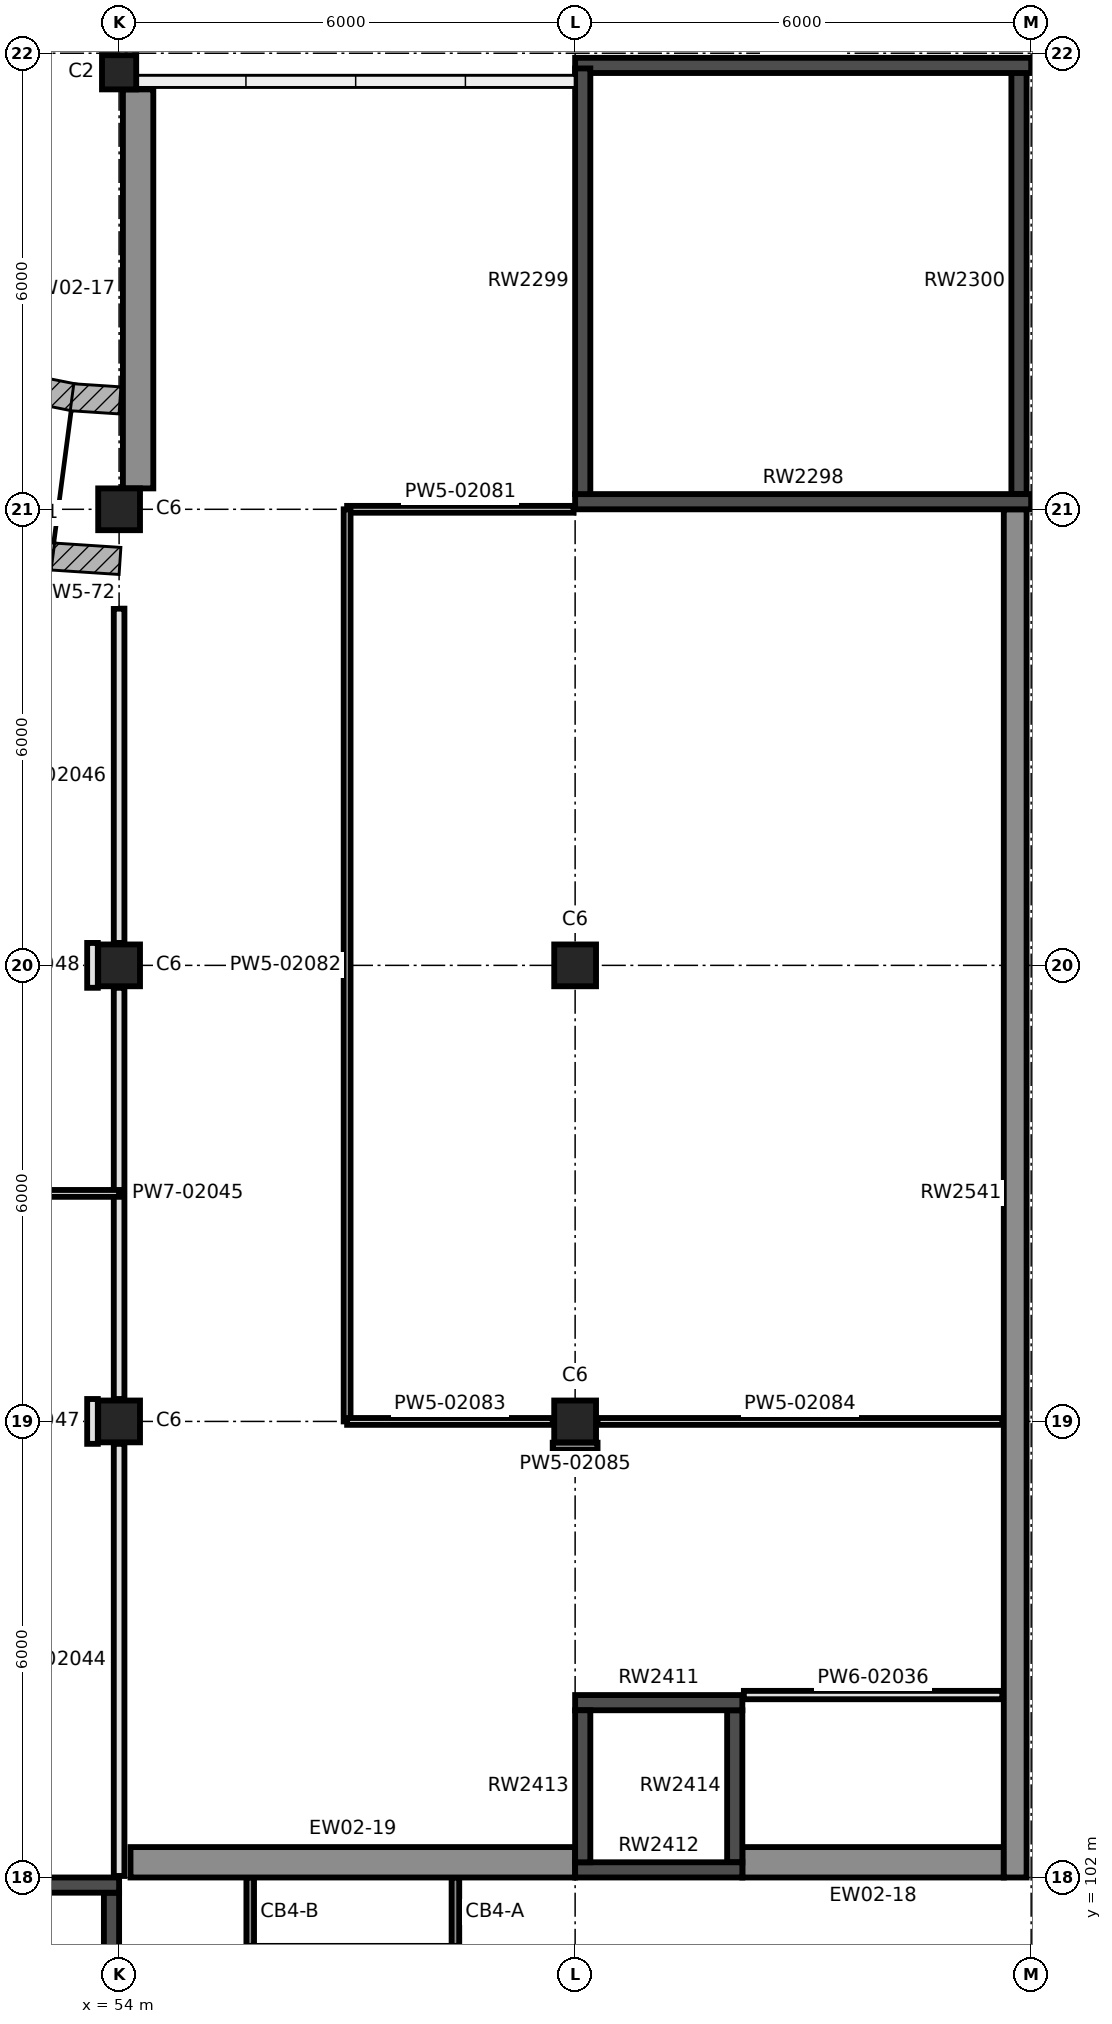
"""IFC4 building model, lengths in metres.
Left out: names, types, materials, properties, quantities, classifications, styles, units other than length and angle.
Written with IfcOpenShell. Run it as: python <this file> out.ifc"""

import sys

from ifc_helpers import new_model, si_unit, direction, frame, frame_2d, origin, origin_2d, place, context, subcontext, project, spatial, polyline, rectangle, outline, extrude, element, fill, save


model = new_model("IFC4")
c1 = context("Model", 3, precision=1e-05, world=origin(), true_north=direction((0.0, 1.0)))
c2 = subcontext(c1, "Body", "Model", "MODEL_VIEW")
j1 = project(units=[si_unit("LENGTHUNIT", "METRE"), si_unit("PLANEANGLEUNIT", "RADIAN")], contexts=[c1])
p1 = place(None, origin())
s1 = spatial("IfcSite", under=j1, at=p1, CompositionType="ELEMENT")
p2 = place(p1, origin())
s2 = spatial("IfcBuilding", under=s1, at=p2, CompositionType="ELEMENT")
p3 = place(p2, frame((0.0, 0.0, 12.0)))
s3 = spatial("IfcBuildingStorey", under=s2, at=p3, CompositionType="ELEMENT", Elevation=12.0)
for number, where, z_axis, x_axis in (
    (1, (54.0, 108.0, 0.0), (0.0, 0.0, 1.0), (1.0, 0.0, 0.0)),
    (2, (60.0, 108.0, 0.0), (0.0, 0.0, 1.0), (1.0, 0.0, 0.0)),
    (3, (54.0, 114.0, 0.0), (0.0, 0.0, 1.0), (1.0, 0.0, 0.0)),
    (4, (60.0, 114.0, 0.0), (0.0, 0.0, 1.0), (1.0, 0.0, 0.0)),
    (5, (54.0, 120.0, 0.0), (0.0, 0.0, 1.0), (1.0, 0.0, 0.0)),
):
    element("IfcColumn", number, at=place(p3, frame(where, z_axis=z_axis, x_axis=x_axis)), inside=s3, PredefinedType="COLUMN", context=c2, shape_type="SweptSolid", body=[
        extrude(rectangle(XDim=0.55, YDim=0.55, at=origin_2d()), origin(), (0.0, 0.0, 1.0), 4.25),
    ])
p4 = place(p3, frame((54.0, 125.75, 0.0), z_axis=(0.0, 0.0, 1.0), x_axis=(1.0, 0.0, 0.0)))
e6 = element("IfcColumn", 6, at=p4, inside=s3, PredefinedType="COLUMN", context=c2, shape_type="SweptSolid", body=[
    extrude(rectangle(XDim=0.45, YDim=0.45, at=origin_2d()), origin(), (0.0, 0.0, 1.0), 4.25),
])
p5 = place(p3, frame((48.0, 101.9, 0.0), z_axis=(0.0, 0.0, 1.0), x_axis=(1.0, 0.0, 0.0)))
e7 = element("IfcWall", 7, at=p5, inside=s3, PredefinedType="SHEAR", context=c2, shape_type="SweptSolid", body=[
    extrude(rectangle(XDim=6.0, YDim=0.2, at=frame_2d((3.0, 0.0))), origin(), (0.0, 0.0, 1.0), 4.5),
])
p6 = place(p5, frame((2.1, 0.0, 0.0)))
e8 = element("IfcOpeningElement", 8, at=p6, cuts=e7, PredefinedType="OPENING", context=c2, shape_type="SweptSolid", body=[
    extrude(rectangle(XDim=1.8, YDim=2.2, at=frame_2d((0.9, 1.1))), frame((0.0, 0.11, 0.0), z_axis=(0.0, -1.0, 0.0), x_axis=(1.0, 0.0, 0.0)), (0.0, 0.0, 1.0), 0.22),
])
p7 = place(p3, frame((53.9, 96.2, 0.0), z_axis=(0.0, 0.0, 1.0), x_axis=(0.0, 1.0, 0.0)))
e9 = element("IfcWall", 9, at=p7, inside=s3, PredefinedType="SHEAR", context=c2, shape_type="SweptSolid", body=[
    extrude(rectangle(XDim=5.6, YDim=0.2, at=frame_2d((2.8, 0.0))), origin(), (0.0, 0.0, 1.0), 4.5),
])
p8 = place(p7, frame((2.55, 0.0, 0.9)))
e10 = element("IfcOpeningElement", 10, at=p8, cuts=e9, PredefinedType="OPENING", context=c2, shape_type="SweptSolid", body=[
    extrude(rectangle(XDim=0.5, YDim=2.1, at=frame_2d((0.25, 1.05))), frame((0.0, 0.11, 0.0), z_axis=(0.0, -1.0, 0.0), x_axis=(1.0, 0.0, 0.0)), (0.0, 0.0, 1.0), 0.22),
])
for number, where, z_axis, x_axis in (
    (11, (60.0, 125.84, 0.0), (0.0, 0.0, 1.0), (1.0, 0.0, 0.0)),
    (12, (60.0, 120.1, 0.0), (0.0, 0.0, 1.0), (1.0, 0.0, 0.0)),
):
    element("IfcWall", number, at=place(p3, frame(where, z_axis=z_axis, x_axis=x_axis)), inside=s3, PredefinedType="SHEAR", context=c2, shape_type="SweptSolid", body=[
        extrude(rectangle(XDim=6.0, YDim=0.2, at=frame_2d((3.0, 0.0))), origin(), (0.0, 0.0, 1.0), 4.25),
    ])
p9 = place(p3, frame((60.1, 120.2, 0.0), z_axis=(0.0, 0.0, 1.0), x_axis=(0.0, 1.0, 0.0)))
e13 = element("IfcWall", 13, at=p9, inside=s3, PredefinedType="SHEAR", context=c2, shape_type="SweptSolid", body=[
    extrude(rectangle(XDim=5.6, YDim=0.2, at=frame_2d((2.8, 0.0))), origin(), (0.0, 0.0, 1.0), 4.25),
])
p10 = place(p9, frame((4.4, 0.0, 0.0)))
e14 = element("IfcOpeningElement", 14, at=p10, cuts=e13, PredefinedType="OPENING", context=c2, shape_type="SweptSolid", body=[
    extrude(rectangle(XDim=1.1, YDim=2.2, at=frame_2d((0.55, 1.1))), frame((0.0, 0.11, 0.0), z_axis=(0.0, -1.0, 0.0), x_axis=(1.0, 0.0, 0.0)), (0.0, 0.0, 1.0), 0.22),
])
p11 = place(p3, frame((65.84, 120.2, 0.0), z_axis=(0.0, 0.0, 1.0), x_axis=(0.0, 1.0, 0.0)))
e15 = element("IfcWall", 15, at=p11, inside=s3, PredefinedType="SHEAR", context=c2, shape_type="SweptSolid", body=[
    extrude(rectangle(XDim=5.6, YDim=0.2, at=frame_2d((2.8, 0.0))), origin(), (0.0, 0.0, 1.0), 4.25),
])
p12 = place(p11, frame((2.55, 0.0, 0.9)))
e16 = element("IfcOpeningElement", 16, at=p12, cuts=e15, PredefinedType="OPENING", context=c2, shape_type="SweptSolid", body=[
    extrude(rectangle(XDim=0.5, YDim=2.1, at=frame_2d((0.25, 1.05))), frame((0.0, 0.11, 0.0), z_axis=(0.0, -1.0, 0.0), x_axis=(1.0, 0.0, 0.0)), (0.0, 0.0, 1.0), 0.22),
])
p13 = place(p3, frame((60.0, 104.3, 0.0), z_axis=(0.0, 0.0, 1.0), x_axis=(1.0, 0.0, 0.0)))
e17 = element("IfcWall", 17, at=p13, inside=s3, PredefinedType="SHEAR", context=c2, shape_type="SweptSolid", body=[
    extrude(rectangle(XDim=2.2, YDim=0.2, at=frame_2d((1.1, 0.0))), origin(), (0.0, 0.0, 1.0), 4.25),
])
p14 = place(p13, frame((0.55, 0.0, 0.0)))
e18 = element("IfcOpeningElement", 18, at=p14, cuts=e17, PredefinedType="OPENING", context=c2, shape_type="SweptSolid", body=[
    extrude(rectangle(XDim=1.1, YDim=2.1, at=frame_2d((0.55, 1.05))), frame((0.0, 0.11, 0.0), z_axis=(0.0, -1.0, 0.0), x_axis=(1.0, 0.0, 0.0)), (0.0, 0.0, 1.0), 0.22),
])
p15 = place(p3, frame((60.0, 102.1, 0.0), z_axis=(0.0, 0.0, 1.0), x_axis=(1.0, 0.0, 0.0)))
e19 = element("IfcWall", 19, at=p15, inside=s3, PredefinedType="SHEAR", context=c2, shape_type="SweptSolid", body=[
    extrude(rectangle(XDim=2.2, YDim=0.2, at=frame_2d((1.1, 0.0))), origin(), (0.0, 0.0, 1.0), 4.25),
])
for number, where, z_axis, x_axis in (
    (20, (60.1, 102.2, 0.0), (0.0, 0.0, 1.0), (0.0, 1.0, 0.0)),
    (21, (62.1, 102.2, 0.0), (0.0, 0.0, 1.0), (0.0, 1.0, 0.0)),
):
    element("IfcWall", number, at=place(p3, frame(where, z_axis=z_axis, x_axis=x_axis)), inside=s3, PredefinedType="SHEAR", context=c2, shape_type="SweptSolid", body=[
        extrude(rectangle(XDim=2.0, YDim=0.2, at=frame_2d((1.0, 0.0))), origin(), (0.0, 0.0, 1.0), 4.25),
    ])
p16 = place(p3, frame((65.79, 102.0, 0.0), z_axis=(0.0, 0.0, 1.0), x_axis=(0.0, 1.0, 0.0)))
e22 = element("IfcWall", 22, at=p16, inside=s3, PredefinedType="SOLIDWALL", context=c2, shape_type="SweptSolid", body=[
    extrude(rectangle(XDim=18.0, YDim=0.3, at=frame_2d((9.0, 0.0))), origin(), (0.0, 0.0, 1.0), 4.5),
])
p17 = place(p3, frame((53.105, 119.201, 0.0), z_axis=(-0.173864175636, -0.874485160623, 0.452821104058), x_axis=(-0.980806494595, 0.194983637213, -3.7134606e-05)))
e23 = element("IfcWall", 23, at=p17, inside=s3, PredefinedType="SOLIDWALL", context=c2, shape_type="SweptSolid", body=[
    extrude(outline(polyline([(0.0, 0.0), (0.897, 0.0), (0.758, -4.654), (0.138, -4.654), (0.0, 0.0)])), origin(), (0.0, 0.453, 0.892), 0.449),
])
p18 = place(p3, frame((54.0, 119.143, 0.0), z_axis=(-0.058375301922, -0.889685498337, 0.452826719811), x_axis=(-0.997852682036, 0.065498262539, 5.0577314e-05)))
e24 = element("IfcWall", 24, at=p18, inside=s3, PredefinedType="SOLIDWALL", context=c2, shape_type="SweptSolid", body=[
    extrude(outline(polyline([(0.0, 0.0), (0.897, -3.469e-18), (0.759, -4.654), (0.139, -4.654), (0.0, 0.0)])), origin(), (-9.547e-05, 0.453, 0.892), 0.449),
])
p19 = place(p3, frame((54.25, 120.275, 0.0), z_axis=(0.0, 0.0, 1.0), x_axis=(0.0, 1.0, 0.0)))
e25 = element("IfcWall", 25, at=p19, inside=s3, PredefinedType="SOLIDWALL", context=c2, shape_type="SweptSolid", body=[
    extrude(rectangle(XDim=5.25, YDim=0.4, at=frame_2d((2.625, 0.0))), origin(), (0.0, 0.0, 1.0), 4.25),
])
p20 = place(p3, frame((65.64, 102.2, 0.0), z_axis=(0.0, 0.0, 1.0), x_axis=(-1.0, 0.0, 0.0)))
e26 = element("IfcWall", 26, at=p20, inside=s3, PredefinedType="SOLIDWALL", context=c2, shape_type="SweptSolid", body=[
    extrude(rectangle(XDim=3.44, YDim=0.4, at=frame_2d((1.72, 0.0))), origin(), (0.0, 0.0, 1.0), 4.25),
])
p21 = place(p20, frame((1.045, 0.0, 0.9)))
e27 = element("IfcOpeningElement", 27, at=p21, cuts=e26, PredefinedType="OPENING", context=c2, shape_type="SweptSolid", body=[
    extrude(rectangle(XDim=1.35, YDim=2.45, at=frame_2d((0.675, 1.225))), frame((0.0, 0.21, 0.0), z_axis=(0.0, -1.0, 0.0), x_axis=(1.0, 0.0, 0.0)), (0.0, 0.0, 1.0), 0.42),
])
p22 = place(p3, frame((60.0, 102.2, 0.0), z_axis=(0.0, 0.0, 1.0), x_axis=(-1.0, 0.0, 0.0)))
e28 = element("IfcWall", 28, at=p22, inside=s3, PredefinedType="SOLIDWALL", context=c2, shape_type="SweptSolid", body=[
    extrude(rectangle(XDim=5.85, YDim=0.4, at=frame_2d((2.925, 0.0))), origin(), (0.0, 0.0, 1.0), 4.25),
])
p23 = place(p22, frame((1.725, 0.0, 0.9)))
e29 = element("IfcOpeningElement", 29, at=p23, cuts=e28, PredefinedType="OPENING", context=c2, shape_type="SweptSolid", body=[
    extrude(rectangle(XDim=2.4, YDim=2.45, at=frame_2d((1.2, 1.225))), frame((0.0, 0.21, 0.0), z_axis=(0.0, -1.0, 0.0), x_axis=(1.0, 0.0, 0.0)), (0.0, 0.0, 1.0), 0.42),
])
for number, where, z_axis, x_axis in (
    (30, (58.425, 102.0, 0.0), (0.0, 0.0, 1.0), (0.0, -1.0, 0.0)),
    (31, (55.725, 102.0, 0.0), (0.0, 0.0, 1.0), (0.0, -1.0, 0.0)),
):
    element("IfcWall", number, at=place(p3, frame(where, z_axis=z_axis, x_axis=x_axis)), inside=s3, PredefinedType="SOLIDWALL", context=c2, shape_type="SweptSolid", body=[
        extrude(rectangle(XDim=0.9, YDim=0.1, at=frame_2d((0.45, 0.0))), origin(), (0.0, 0.0, 1.0), 3.5),
    ])
p24 = place(p3, frame((62.22, 104.4, 0.0), z_axis=(0.0, 0.0, 1.0), x_axis=(1.0, 0.0, 0.0)))
e32 = element("IfcWall", 32, at=p24, inside=s3, PredefinedType="PARTITIONING", context=c2, shape_type="SweptSolid", body=[
    extrude(rectangle(XDim=3.4, YDim=0.11, at=frame_2d((1.7, 0.0))), origin(), (0.0, 0.0, 1.0), 4.28),
])
p25 = place(p24, frame((1.53, 0.0, 0.0)))
e33 = element("IfcOpeningElement", 33, at=p25, cuts=e32, PredefinedType="OPENING", context=c2, shape_type="SweptSolid", body=[
    extrude(rectangle(XDim=0.75, YDim=2.04, at=frame_2d((0.375, 1.02))), frame((0.0, 0.065, 0.0), z_axis=(0.0, -1.0, 0.0), x_axis=(1.0, 0.0, 0.0)), (0.0, 0.0, 1.0), 0.13),
])
p26 = place(p3, frame((54.0, 102.02, 0.0), z_axis=(0.0, 0.0, 1.0), x_axis=(0.0, 1.0, 0.0)))
e34 = element("IfcWall", 34, at=p26, inside=s3, PredefinedType="PARTITIONING", context=c2, shape_type="SweptSolid", body=[
    extrude(rectangle(XDim=5.685, YDim=0.14, at=frame_2d((2.843, 0.0))), origin(), (0.0, 0.0, 1.0), 3.55),
])
p27 = place(p26, frame((2.03, 0.0, 0.0)))
e35 = element("IfcOpeningElement", 35, at=p27, cuts=e34, PredefinedType="OPENING", context=c2, shape_type="SweptSolid", body=[
    extrude(rectangle(XDim=1.8, YDim=2.1, at=frame_2d((0.9, 1.05))), frame((0.0, 0.08, 0.0), z_axis=(0.0, -1.0, 0.0), x_axis=(1.0, 0.0, 0.0)), (0.0, 0.0, 1.0), 0.16),
])
p28 = place(p3, frame((54.0, 108.295, 0.0), z_axis=(0.0, 0.0, 1.0), x_axis=(0.0, 1.0, 0.0)))
e36 = element("IfcWall", 36, at=p28, inside=s3, PredefinedType="PARTITIONING", context=c2, shape_type="SweptSolid", body=[
    extrude(rectangle(XDim=5.41, YDim=0.14, at=frame_2d((2.705, 0.0))), origin(), (0.0, 0.0, 1.0), 3.45),
])
p29 = place(p28, frame((0.255, 0.0, 0.0)))
e37 = element("IfcOpeningElement", 37, at=p29, cuts=e36, PredefinedType="OPENING", context=c2, shape_type="SweptSolid", body=[
    extrude(rectangle(XDim=1.8, YDim=2.1, at=frame_2d((0.9, 1.05))), frame((0.0, 0.08, 0.0), z_axis=(0.0, -1.0, 0.0), x_axis=(1.0, 0.0, 0.0)), (0.0, 0.0, 1.0), 0.16),
])
p30 = place(p3, frame((54.0, 114.295, 0.0), z_axis=(0.0, 0.0, 1.0), x_axis=(0.0, 1.0, 0.0)))
e38 = element("IfcWall", 38, at=p30, inside=s3, PredefinedType="PARTITIONING", context=c2, shape_type="SweptSolid", body=[
    extrude(rectangle(XDim=4.398, YDim=0.14, at=frame_2d((2.199, 0.0))), origin(), (0.0, 0.0, 1.0), 3.45),
])
p31 = place(p30, frame((0.155, 0.0, 0.0)))
e39 = element("IfcOpeningElement", 39, at=p31, cuts=e38, PredefinedType="OPENING", context=c2, shape_type="SweptSolid", body=[
    extrude(rectangle(XDim=0.92, YDim=2.04, at=frame_2d((0.46, 1.02))), frame((0.0, 0.08, 0.0), z_axis=(0.0, -1.0, 0.0), x_axis=(1.0, 0.0, 0.0)), (0.0, 0.0, 1.0), 0.16),
])
p32 = place(p3, frame((53.65, 107.705, 0.0), z_axis=(0.0, 0.0, 1.0), x_axis=(0.0, 1.0, 0.0)))
e40 = element("IfcWall", 40, at=p32, inside=s3, PredefinedType="PARTITIONING", context=c2, shape_type="SweptSolid", body=[
    extrude(rectangle(XDim=0.59, YDim=0.14, at=frame_2d((0.295, 0.0))), origin(), (0.0, 0.0, 1.0), 3.55),
])
p33 = place(p3, frame((53.65, 113.705, 0.0), z_axis=(0.0, 0.0, 1.0), x_axis=(0.0, 1.0, 0.0)))
e41 = element("IfcWall", 41, at=p33, inside=s3, PredefinedType="PARTITIONING", context=c2, shape_type="SweptSolid", body=[
    extrude(rectangle(XDim=0.59, YDim=0.14, at=frame_2d((0.295, 0.0))), origin(), (0.0, 0.0, 1.0), 4.25),
])
p34 = place(p3, frame((48.0, 111.0, 0.0), z_axis=(0.0, 0.0, 1.0), x_axis=(1.0, 0.0, 0.0)))
e42 = element("IfcWall", 42, at=p34, inside=s3, PredefinedType="PARTITIONING", context=c2, shape_type="SweptSolid", body=[
    extrude(rectangle(XDim=6.0, YDim=0.09, at=frame_2d((3.0, 0.0))), origin(), (0.0, 0.0, 1.0), 4.25),
])
p35 = place(p3, frame((57.0, 120.0, 0.0), z_axis=(0.0, 0.0, 1.0), x_axis=(1.0, 0.0, 0.0)))
e43 = element("IfcWall", 43, at=p35, inside=s3, PredefinedType="PARTITIONING", context=c2, shape_type="SweptSolid", body=[
    extrude(rectangle(XDim=2.98, YDim=0.09, at=frame_2d((1.49, 0.0))), origin(), (0.0, 0.0, 1.0), 4.28),
])
p36 = place(p3, frame((57.0, 108.0, 0.0), z_axis=(0.0, 0.0, 1.0), x_axis=(0.0, 1.0, 0.0)))
e44 = element("IfcWall", 44, at=p36, inside=s3, PredefinedType="PARTITIONING", context=c2, shape_type="SweptSolid", body=[
    extrude(rectangle(XDim=12.0, YDim=0.09, at=frame_2d((6.0, 0.0))), origin(), (0.0, 0.0, 1.0), 3.75),
])
p37 = place(p36, frame((5.25, 0.0, 0.0)))
e45 = element("IfcOpeningElement", 45, at=p37, cuts=e44, PredefinedType="OPENING", context=c2, shape_type="SweptSolid", body=[
    extrude(rectangle(XDim=1.5, YDim=2.1, at=frame_2d((0.75, 1.05))), frame((0.0, 0.055, 0.0), z_axis=(0.0, -1.0, 0.0), x_axis=(1.0, 0.0, 0.0)), (0.0, 0.0, 1.0), 0.11),
])
p38 = place(p3, frame((57.0, 108.0, 0.0), z_axis=(0.0, 0.0, 1.0), x_axis=(1.0, 0.0, 0.0)))
e46 = element("IfcWall", 46, at=p38, inside=s3, PredefinedType="PARTITIONING", context=c2, shape_type="SweptSolid", body=[
    extrude(rectangle(XDim=2.705, YDim=0.09, at=frame_2d((1.353, 0.0))), origin(), (0.0, 0.0, 1.0), 3.75),
])
p39 = place(p3, frame((60.295, 108.0, 0.0), z_axis=(0.0, 0.0, 1.0), x_axis=(1.0, 0.0, 0.0)))
e47 = element("IfcWall", 47, at=p39, inside=s3, PredefinedType="PARTITIONING", context=c2, shape_type="SweptSolid", body=[
    extrude(rectangle(XDim=5.325, YDim=0.09, at=frame_2d((2.663, 0.0))), origin(), (0.0, 0.0, 1.0), 4.28),
])
p40 = place(p3, frame((59.705, 107.675, 0.0), z_axis=(0.0, 0.0, 1.0), x_axis=(1.0, 0.0, 0.0)))
e48 = element("IfcWall", 48, at=p40, inside=s3, PredefinedType="PARTITIONING", context=c2, shape_type="SweptSolid", body=[
    extrude(rectangle(XDim=0.59, YDim=0.09, at=frame_2d((0.295, 0.0))), origin(), (0.0, 0.0, 1.0), 4.28),
])
p41 = place(p21, origin())
e49 = element("IfcWindow", 49, at=p41, inside=s3, PartitioningType="SINGLE_PANEL", PredefinedType="WINDOW", context=c2, shape_type="SweptSolid", body=[
    extrude(rectangle(XDim=1.35, YDim=2.45, at=frame_2d((0.675, 1.225))), frame((0.0, 0.03, 0.0), z_axis=(0.0, -1.0, 0.0), x_axis=(1.0, 0.0, 0.0)), (0.0, 0.0, 1.0), 0.06),
])
fill(e27, e49)
p42 = place(p12, origin())
e50 = element("IfcWindow", 50, at=p42, inside=s3, PartitioningType="SINGLE_PANEL", PredefinedType="WINDOW", context=c2, shape_type="SweptSolid", body=[
    extrude(rectangle(XDim=0.5, YDim=2.1, at=frame_2d((0.25, 1.05))), frame((0.0, 0.03, 0.0), z_axis=(0.0, -1.0, 0.0), x_axis=(1.0, 0.0, 0.0)), (0.0, 0.0, 1.0), 0.06),
])
fill(e16, e50)
p43 = place(p23, origin())
e51 = element("IfcWindow", 51, at=p43, inside=s3, PartitioningType="SINGLE_PANEL", PredefinedType="WINDOW", context=c2, shape_type="SweptSolid", body=[
    extrude(rectangle(XDim=2.4, YDim=2.45, at=frame_2d((1.2, 1.225))), frame((0.0, 0.03, 0.0), z_axis=(0.0, -1.0, 0.0), x_axis=(1.0, 0.0, 0.0)), (0.0, 0.0, 1.0), 0.06),
])
fill(e29, e51)
p44 = place(p37, origin())
e52 = element("IfcDoor", 52, at=p44, inside=s3, OperationType="DOUBLE_DOOR_SINGLE_SWING", PredefinedType="DOOR", context=c2, shape_type="SweptSolid", body=[
    extrude(rectangle(XDim=1.5, YDim=2.1, at=frame_2d((0.75, 1.05))), frame((0.0, 0.025, 0.0), z_axis=(0.0, -1.0, 0.0), x_axis=(1.0, 0.0, 0.0)), (0.0, 0.0, 1.0), 0.05),
])
fill(e45, e52)
p45 = place(p31, origin())
e53 = element("IfcDoor", 53, at=p45, inside=s3, OperationType="SINGLE_SWING_LEFT", PredefinedType="DOOR", context=c2, shape_type="SweptSolid", body=[
    extrude(rectangle(XDim=0.92, YDim=2.04, at=frame_2d((0.46, 1.02))), frame((0.0, 0.025, 0.0), z_axis=(0.0, -1.0, 0.0), x_axis=(1.0, 0.0, 0.0)), (0.0, 0.0, 1.0), 0.05),
])
fill(e39, e53)
p46 = place(p10, frame((1.1, 0.0, 0.0), z_axis=(0.0, 0.0, 1.0), x_axis=(-1.0, 0.0, 0.0)))
e54 = element("IfcDoor", 54, at=p46, inside=s3, OperationType="SINGLE_SWING_RIGHT", PredefinedType="DOOR", context=c2, shape_type="SweptSolid", body=[
    extrude(rectangle(XDim=1.1, YDim=2.2, at=frame_2d((0.55, 1.1))), frame((0.0, 0.025, 0.0), z_axis=(0.0, -1.0, 0.0), x_axis=(1.0, 0.0, 0.0)), (0.0, 0.0, 1.0), 0.05),
])
fill(e14, e54)
p47 = place(p25, frame((0.75, 0.0, 0.0), z_axis=(0.0, 0.0, 1.0), x_axis=(-1.0, 0.0, 0.0)))
e55 = element("IfcDoor", 55, at=p47, inside=s3, OperationType="SINGLE_SWING_RIGHT", PredefinedType="DOOR", context=c2, shape_type="SweptSolid", body=[
    extrude(rectangle(XDim=0.75, YDim=2.04, at=frame_2d((0.375, 1.02))), frame((0.0, 0.025, 0.0), z_axis=(0.0, -1.0, 0.0), x_axis=(1.0, 0.0, 0.0)), (0.0, 0.0, 1.0), 0.05),
])
fill(e33, e55)
p48 = place(p27, origin())
e56 = element("IfcDoor", 56, at=p48, inside=s3, OperationType="DOUBLE_DOOR_SINGLE_SWING", PredefinedType="DOOR", context=c2, shape_type="SweptSolid", body=[
    extrude(rectangle(XDim=1.8, YDim=2.1, at=frame_2d((0.9, 1.05))), frame((0.0, 0.025, 0.0), z_axis=(0.0, -1.0, 0.0), x_axis=(1.0, 0.0, 0.0)), (0.0, 0.0, 1.0), 0.05),
])
fill(e35, e56)
p49 = place(p29, origin())
e57 = element("IfcDoor", 57, at=p49, inside=s3, OperationType="DOUBLE_DOOR_SINGLE_SWING", PredefinedType="DOOR", context=c2, shape_type="SweptSolid", body=[
    extrude(rectangle(XDim=1.8, YDim=2.1, at=frame_2d((0.9, 1.05))), frame((0.0, 0.025, 0.0), z_axis=(0.0, -1.0, 0.0), x_axis=(1.0, 0.0, 0.0)), (0.0, 0.0, 1.0), 0.05),
])
fill(e37, e57)
p50 = place(p14, origin())
e58 = element("IfcDoor", 58, at=p50, inside=s3, OperationType="DOUBLE_DOOR_SLIDING", PredefinedType="DOOR", context=c2, shape_type="SweptSolid", body=[
    extrude(rectangle(XDim=1.1, YDim=2.1, at=frame_2d((0.55, 1.05))), frame((0.0, 0.025, 0.0), z_axis=(0.0, -1.0, 0.0), x_axis=(1.0, 0.0, 0.0)), (0.0, 0.0, 1.0), 0.05),
])
fill(e18, e58)
save(model, sys.argv[1])
